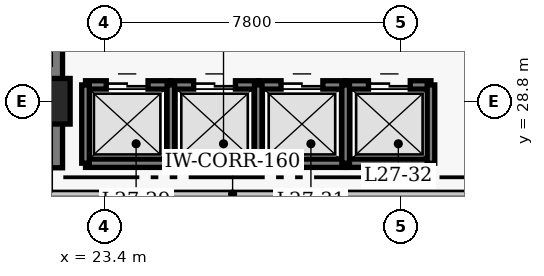
"""IFC4 building model, lengths in metres.
Left out: names, types, materials, properties, quantities, classifications, styles, units other than length and angle.
Written with IfcOpenShell. Run it as: python <this file> out.ifc"""

import sys

from ifc_helpers import new_model, si_unit, direction, frame, frame_2d, origin, origin_2d, place, context, subcontext, project, spatial, rectangle, extrude, element, fill, save


model = new_model("IFC4")
c1 = context("Model", 3, precision=1e-05, world=origin(), true_north=direction((0.0, 1.0)))
c2 = subcontext(c1, "Body", "Model", "MODEL_VIEW")
j1 = project(units=[si_unit("LENGTHUNIT", "METRE"), si_unit("PLANEANGLEUNIT", "RADIAN")], contexts=[c1])
p1 = place(None, origin())
s1 = spatial("IfcSite", under=j1, at=p1, CompositionType="ELEMENT")
p2 = place(p1, origin())
s2 = spatial("IfcBuilding", under=s1, at=p2, CompositionType="ELEMENT")
p3 = place(p2, frame((0.0, 0.0, 110.8)))
s3 = spatial("IfcBuildingStorey", under=s2, at=p3, CompositionType="ELEMENT", Elevation=110.8)
p4 = place(p3, frame((21.9, 27.05, 0.0), z_axis=(0.0, 0.0, 1.0), x_axis=(0.0, 1.0, 0.0)))
e1 = element("IfcWall", 1, at=p4, inside=s3, PredefinedType="SHEAR", context=c2, shape_type="SweptSolid", body=[
    extrude(rectangle(XDim=13.67, YDim=0.8, at=frame_2d((6.835, 0.0))), origin(), (0.0, 0.0, 1.0), 3.8),
])
p5 = place(p3, frame((21.9, 28.8, 0.0), z_axis=(0.0, 0.0, 1.0), x_axis=(1.0, 0.0, 0.0)))
e2 = element("IfcColumn", 2, at=p5, inside=s3, PredefinedType="COLUMN", context=c2, shape_type="SweptSolid", body=[
    extrude(rectangle(XDim=1.2, YDim=1.2, at=origin_2d()), origin(), (0.0, 0.0, 1.0), 3.8),
])
p6 = place(p3, frame((22.905, 29.23, 0.0), z_axis=(0.0, 0.0, 1.0), x_axis=(1.0, 0.0, 0.0)))
e3 = element("IfcWall", 3, at=p6, inside=s3, PredefinedType="SHEAR", context=c2, shape_type="SweptSolid", body=[
    extrude(rectangle(XDim=2.245, YDim=0.22, at=frame_2d((1.123, 0.0))), origin(), (0.0, 0.0, 1.0), 3.8),
])
p7 = place(p6, frame((0.545, 0.0, 0.0)))
e4 = element("IfcOpeningElement", 4, at=p7, cuts=e3, PredefinedType="OPENING", context=c2, shape_type="SweptSolid", body=[
    extrude(rectangle(XDim=1.1, YDim=2.15, at=frame_2d((0.55, 1.075))), frame((0.0, 0.12, 0.0), z_axis=(0.0, -1.0, 0.0), x_axis=(1.0, 0.0, 0.0)), (0.0, 0.0, 1.0), 0.24),
])
p8 = place(p3, frame((22.905, 27.17, 0.0), z_axis=(0.0, 0.0, 1.0), x_axis=(1.0, 0.0, 0.0)))
e5 = element("IfcWall", 5, at=p8, inside=s3, PredefinedType="SHEAR", context=c2, shape_type="SweptSolid", body=[
    extrude(rectangle(XDim=2.245, YDim=0.22, at=frame_2d((1.123, 0.0))), origin(), (0.0, 0.0, 1.0), 3.8),
])
p9 = place(p3, frame((22.905, 27.17, 0.0), z_axis=(0.0, 0.0, 1.0), x_axis=(0.0, 1.0, 0.0)))
e6 = element("IfcWall", 6, at=p9, inside=s3, PredefinedType="SHEAR", context=c2, shape_type="SweptSolid", body=[
    extrude(rectangle(XDim=2.06, YDim=0.2, at=frame_2d((1.03, 0.0))), origin(), (0.0, 0.0, 1.0), 3.8),
])
p10 = place(p3, frame((25.15, 29.23, 0.0), z_axis=(0.0, 0.0, 1.0), x_axis=(1.0, 0.0, 0.0)))
e7 = element("IfcWall", 7, at=p10, inside=s3, PredefinedType="SHEAR", context=c2, shape_type="SweptSolid", body=[
    extrude(rectangle(XDim=2.3, YDim=0.22, at=frame_2d((1.15, 0.0))), origin(), (0.0, 0.0, 1.0), 3.8),
])
p11 = place(p10, frame((0.6, 0.0, 0.0)))
e8 = element("IfcOpeningElement", 8, at=p11, cuts=e7, PredefinedType="OPENING", context=c2, shape_type="SweptSolid", body=[
    extrude(rectangle(XDim=1.1, YDim=2.15, at=frame_2d((0.55, 1.075))), frame((0.0, 0.12, 0.0), z_axis=(0.0, -1.0, 0.0), x_axis=(1.0, 0.0, 0.0)), (0.0, 0.0, 1.0), 0.24),
])
p12 = place(p3, frame((25.15, 27.17, 0.0), z_axis=(0.0, 0.0, 1.0), x_axis=(1.0, 0.0, 0.0)))
e9 = element("IfcWall", 9, at=p12, inside=s3, PredefinedType="SHEAR", context=c2, shape_type="SweptSolid", body=[
    extrude(rectangle(XDim=2.3, YDim=0.22, at=frame_2d((1.15, 0.0))), origin(), (0.0, 0.0, 1.0), 3.8),
])
p13 = place(p3, frame((25.15, 27.17, 0.0), z_axis=(0.0, 0.0, 1.0), x_axis=(0.0, 1.0, 0.0)))
e10 = element("IfcWall", 10, at=p13, inside=s3, PredefinedType="SHEAR", context=c2, shape_type="SweptSolid", body=[
    extrude(rectangle(XDim=2.06, YDim=0.2, at=frame_2d((1.03, 0.0))), origin(), (0.0, 0.0, 1.0), 3.8),
])
p14 = place(p3, frame((27.45, 29.23, 0.0), z_axis=(0.0, 0.0, 1.0), x_axis=(1.0, 0.0, 0.0)))
e11 = element("IfcWall", 11, at=p14, inside=s3, PredefinedType="SHEAR", context=c2, shape_type="SweptSolid", body=[
    extrude(rectangle(XDim=2.3, YDim=0.22, at=frame_2d((1.15, 0.0))), origin(), (0.0, 0.0, 1.0), 3.8),
])
p15 = place(p14, frame((0.6, 0.0, 0.0)))
e12 = element("IfcOpeningElement", 12, at=p15, cuts=e11, PredefinedType="OPENING", context=c2, shape_type="SweptSolid", body=[
    extrude(rectangle(XDim=1.1, YDim=2.15, at=frame_2d((0.55, 1.075))), frame((0.0, 0.12, 0.0), z_axis=(0.0, -1.0, 0.0), x_axis=(1.0, 0.0, 0.0)), (0.0, 0.0, 1.0), 0.24),
])
p16 = place(p3, frame((27.45, 27.17, 0.0), z_axis=(0.0, 0.0, 1.0), x_axis=(1.0, 0.0, 0.0)))
e13 = element("IfcWall", 13, at=p16, inside=s3, PredefinedType="SHEAR", context=c2, shape_type="SweptSolid", body=[
    extrude(rectangle(XDim=2.3, YDim=0.22, at=frame_2d((1.15, 0.0))), origin(), (0.0, 0.0, 1.0), 3.8),
])
p17 = place(p3, frame((27.45, 27.17, 0.0), z_axis=(0.0, 0.0, 1.0), x_axis=(0.0, 1.0, 0.0)))
e14 = element("IfcWall", 14, at=p17, inside=s3, PredefinedType="SHEAR", context=c2, shape_type="SweptSolid", body=[
    extrude(rectangle(XDim=2.06, YDim=0.2, at=frame_2d((1.03, 0.0))), origin(), (0.0, 0.0, 1.0), 3.8),
])
p18 = place(p3, frame((29.75, 29.23, 0.0), z_axis=(0.0, 0.0, 1.0), x_axis=(1.0, 0.0, 0.0)))
e15 = element("IfcWall", 15, at=p18, inside=s3, PredefinedType="SHEAR", context=c2, shape_type="SweptSolid", body=[
    extrude(rectangle(XDim=2.245, YDim=0.22, at=frame_2d((1.123, 0.0))), origin(), (0.0, 0.0, 1.0), 3.8),
])
p19 = place(p18, frame((0.6, 0.0, 0.0)))
e16 = element("IfcOpeningElement", 16, at=p19, cuts=e15, PredefinedType="OPENING", context=c2, shape_type="SweptSolid", body=[
    extrude(rectangle(XDim=1.1, YDim=2.15, at=frame_2d((0.55, 1.075))), frame((0.0, 0.12, 0.0), z_axis=(0.0, -1.0, 0.0), x_axis=(1.0, 0.0, 0.0)), (0.0, 0.0, 1.0), 0.24),
])
p20 = place(p3, frame((29.75, 27.17, 0.0), z_axis=(0.0, 0.0, 1.0), x_axis=(1.0, 0.0, 0.0)))
e17 = element("IfcWall", 17, at=p20, inside=s3, PredefinedType="SHEAR", context=c2, shape_type="SweptSolid", body=[
    extrude(rectangle(XDim=2.245, YDim=0.22, at=frame_2d((1.123, 0.0))), origin(), (0.0, 0.0, 1.0), 3.8),
])
for number, where, z_axis, x_axis in (
    (18, (29.75, 27.17, 0.0), (0.0, 0.0, 1.0), (0.0, 1.0, 0.0)),
    (19, (31.995, 27.17, 0.0), (0.0, 0.0, 1.0), (0.0, 1.0, 0.0)),
):
    element("IfcWall", number, at=place(p3, frame(where, z_axis=z_axis, x_axis=x_axis)), inside=s3, PredefinedType="SHEAR", context=c2, shape_type="SweptSolid", body=[
        extrude(rectangle(XDim=2.06, YDim=0.2, at=frame_2d((1.03, 0.0))), origin(), (0.0, 0.0, 1.0), 3.8),
    ])
p21 = place(p3, frame((19.9, 26.36, 0.0), z_axis=(0.0, 0.0, 1.0), x_axis=(1.0, 0.0, 0.0)))
e20 = element("IfcWall", 20, at=p21, inside=s3, PredefinedType="PARTITIONING", context=c2, shape_type="SweptSolid", body=[
    extrude(rectangle(XDim=13.75, YDim=0.16, at=frame_2d((6.875, 0.0))), origin(), (0.0, 0.0, 1.0), 3.54),
])
p22 = place(p7, origin())
e21 = element("IfcDoor", 21, at=p22, inside=s3, OperationType="DOUBLE_DOOR_SLIDING", PredefinedType="DOOR", context=c2, shape_type="SweptSolid", body=[
    extrude(rectangle(XDim=1.1, YDim=2.15, at=frame_2d((0.55, 1.075))), frame((0.0, 0.025, 0.0), z_axis=(0.0, -1.0, 0.0), x_axis=(1.0, 0.0, 0.0)), (0.0, 0.0, 1.0), 0.05),
])
fill(e4, e21)
p23 = place(p11, origin())
e22 = element("IfcDoor", 22, at=p23, inside=s3, OperationType="DOUBLE_DOOR_SLIDING", PredefinedType="DOOR", context=c2, shape_type="SweptSolid", body=[
    extrude(rectangle(XDim=1.1, YDim=2.15, at=frame_2d((0.55, 1.075))), frame((0.0, 0.025, 0.0), z_axis=(0.0, -1.0, 0.0), x_axis=(1.0, 0.0, 0.0)), (0.0, 0.0, 1.0), 0.05),
])
fill(e8, e22)
p24 = place(p15, origin())
e23 = element("IfcDoor", 23, at=p24, inside=s3, OperationType="DOUBLE_DOOR_SLIDING", PredefinedType="DOOR", context=c2, shape_type="SweptSolid", body=[
    extrude(rectangle(XDim=1.1, YDim=2.15, at=frame_2d((0.55, 1.075))), frame((0.0, 0.025, 0.0), z_axis=(0.0, -1.0, 0.0), x_axis=(1.0, 0.0, 0.0)), (0.0, 0.0, 1.0), 0.05),
])
fill(e12, e23)
p25 = place(p19, origin())
e24 = element("IfcDoor", 24, at=p25, inside=s3, OperationType="DOUBLE_DOOR_SLIDING", PredefinedType="DOOR", context=c2, shape_type="SweptSolid", body=[
    extrude(rectangle(XDim=1.1, YDim=2.15, at=frame_2d((0.55, 1.075))), frame((0.0, 0.025, 0.0), z_axis=(0.0, -1.0, 0.0), x_axis=(1.0, 0.0, 0.0)), (0.0, 0.0, 1.0), 0.05),
])
fill(e16, e24)
save(model, sys.argv[1])
